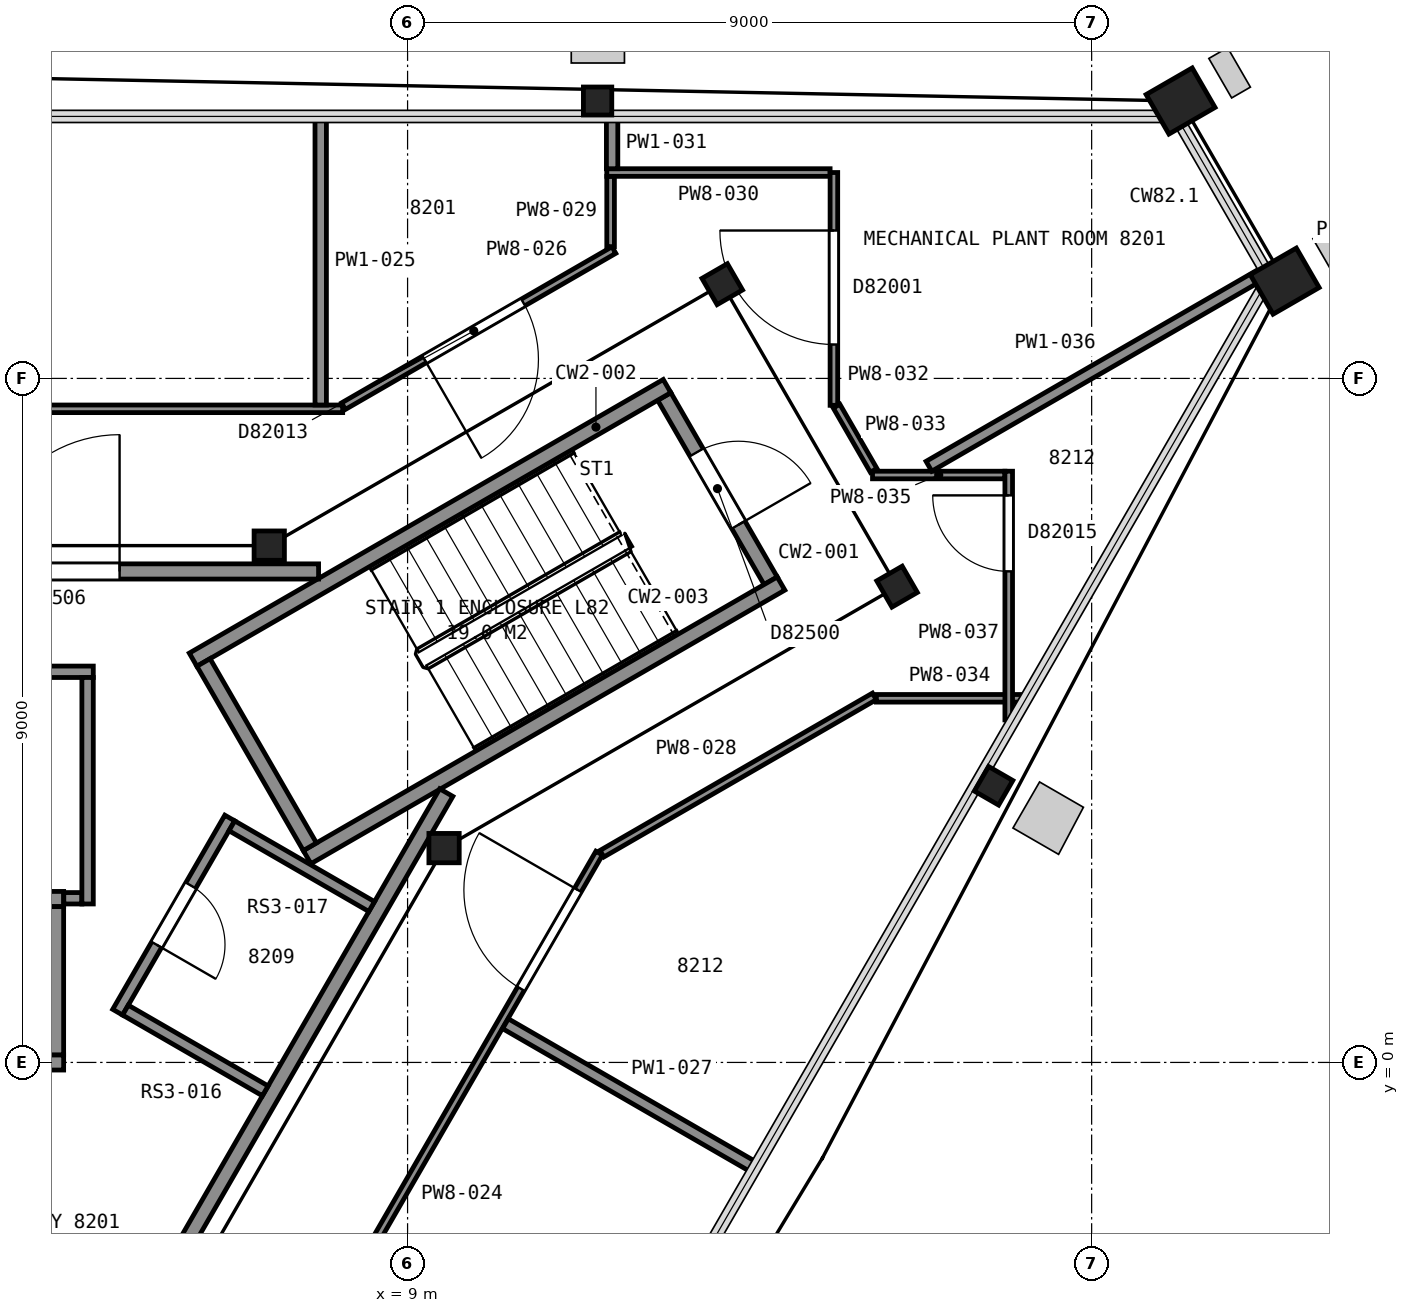
"""IFC4 building model, lengths in metres.
Left out: names, types, materials, properties, quantities, classifications, styles, units other than length and angle.
Written with IfcOpenShell. Run it as: python <this file> out.ifc"""

import sys

from ifc_helpers import new_model, si_unit, direction, frame, frame_2d, origin, origin_2d, place, context, subcontext, project, spatial, rectangle, hollow_rectangle, i_section, extrude, element, fill, save


model = new_model("IFC4")
c1 = context("Model", 3, precision=1e-05, world=origin(), true_north=direction((0.0, 1.0)))
c2 = subcontext(c1, "Body", "Model", "MODEL_VIEW")
j1 = project(units=[si_unit("LENGTHUNIT", "METRE"), si_unit("PLANEANGLEUNIT", "RADIAN")], contexts=[c1])
p1 = place(None, origin())
s1 = spatial("IfcSite", under=j1, at=p1, CompositionType="ELEMENT")
p2 = place(p1, origin())
s2 = spatial("IfcBuilding", under=s1, at=p2, CompositionType="ELEMENT")
p3 = place(p2, frame((0.0, 0.0, 325.2)))
s3 = spatial("IfcBuildingStorey", under=s2, at=p3, CompositionType="ELEMENT", Elevation=325.2)
p4 = place(p3, frame((19.17, 12.65, 0.0), z_axis=(0.0, 0.0, 1.0), x_axis=(0.5, -0.866025403784, 0.0)))
e1 = element("IfcColumn", 1, at=p4, inside=s3, PredefinedType="COLUMN", context=c2, shape_type="SweptSolid", body=[
    extrude(hollow_rectangle(XDim=0.6, YDim=0.7, WallThickness=0.04, at=origin_2d()), origin(), (0.0, 0.0, 1.0), 4.2),
])
for number, where, z_axis, x_axis in (
    (2, (11.5, 12.65, 0.0), (0.0, 0.0, 1.0), (1.0, 0.0, 0.0)),
    (3, (16.71, 3.64, 0.0), (0.0, 0.0, 1.0), (-0.5, -0.866, 0.0)),
):
    element("IfcColumn", number, at=place(p3, frame(where, z_axis=z_axis, x_axis=x_axis)), inside=s3, PredefinedType="COLUMN", context=c2, shape_type="SweptSolid", body=[
        extrude(i_section(OverallWidth=0.373, OverallDepth=0.368, WebThickness=0.015, FlangeThickness=0.024, FilletRadius=0.015, at=origin_2d()), origin(), (0.0, 0.0, 1.0), 4.2),
    ])
p5 = place(p3, frame((20.54, 10.28, 0.0), z_axis=(0.0, 0.0, 1.0), x_axis=(0.5, -0.866025403784, 0.0)))
e4 = element("IfcColumn", 4, at=p5, inside=s3, PredefinedType="COLUMN", context=c2, shape_type="SweptSolid", body=[
    extrude(hollow_rectangle(XDim=0.6, YDim=0.7, WallThickness=0.04, at=origin_2d()), origin(), (0.0, 0.0, 1.0), 4.2),
])
for number, where, z_axis, x_axis in (
    (5, (9.48, 2.82, 0.0), (0.0, 0.0, 1.0), (1.0, 0.0, 0.0)),
    (6, (15.44, 6.26, 0.0), (0.0, 0.0, 1.0), (0.5, -0.866, 0.0)),
    (7, (13.14, 10.24, 0.0), (0.0, 0.0, 1.0), (0.5, -0.866, 0.0)),
    (8, (7.18, 6.8, 0.0), (0.0, 0.0, 1.0), (1.0, 0.0, 0.0)),
):
    element("IfcColumn", number, at=place(p3, frame(where, z_axis=z_axis, x_axis=x_axis)), inside=s3, PredefinedType="COLUMN", context=c2, shape_type="SweptSolid", body=[
        extrude(i_section(OverallWidth=0.399, OverallDepth=0.386, WebThickness=0.021, FlangeThickness=0.033, FilletRadius=0.015, at=origin_2d()), origin(), (0.0, 0.0, 1.0), 4.2),
    ])
p6 = place(p3, frame((13.777, 6.338, 0.0), z_axis=(0.0, 0.0, 1.0), x_axis=(-0.500049511043, 0.865996816683, 0.0)))
e9 = element("IfcWall", 9, at=p6, inside=s3, PredefinedType="PARTITIONING", context=c2, shape_type="SweptSolid", body=[
    extrude(rectangle(XDim=2.8, YDim=0.2, at=frame_2d((1.4, 0.0))), origin(), (0.0, 0.0, 1.0), 3.95),
])
p7 = place(p6, frame((0.85, 0.0, 0.0)))
e10 = element("IfcOpeningElement", 10, at=p7, cuts=e9, PredefinedType="OPENING", context=c2, shape_type="SweptSolid", body=[
    extrude(rectangle(XDim=1.1, YDim=2.1, at=frame_2d((0.55, 1.05))), frame((0.0, 0.11, 0.0), z_axis=(0.0, -1.0, 0.0), x_axis=(1.0, 0.0, 0.0)), (0.0, 0.0, 1.0), 0.22),
])
for number, where, z_axis, x_axis in (
    (11, (6.178, 5.299, 0.0), (0.0, 0.0, 1.0), (0.866, 0.5, 0.0)),
    (12, (7.678, 2.701, 0.0), (0.0, 0.0, 1.0), (0.866, 0.5, 0.0)),
):
    element("IfcWall", number, at=place(p3, frame(where, z_axis=z_axis, x_axis=x_axis)), inside=s3, PredefinedType="PARTITIONING", context=c2, shape_type="SweptSolid", body=[
        extrude(rectangle(XDim=7.2, YDim=0.2, at=frame_2d((3.6, 0.0))), origin(), (0.0, 0.0, 1.0), 3.95),
    ])
p8 = place(p3, frame((7.715, 2.838, 0.0), z_axis=(0.0, 0.0, 1.0), x_axis=(-0.500049511043, 0.865996816683, 0.0)))
e13 = element("IfcWall", 13, at=p8, inside=s3, PredefinedType="PARTITIONING", context=c2, shape_type="SweptSolid", body=[
    extrude(rectangle(XDim=2.8, YDim=0.2, at=frame_2d((1.4, 0.0))), origin(), (0.0, 0.0, 1.0), 3.95),
])
p9 = place(p3, frame((1.525, 0.0, 0.0), z_axis=(0.0, 0.0, 1.0), x_axis=(1.0, 0.0, 0.0)))
e14 = element("IfcWall", 14, at=p9, inside=s3, PredefinedType="PARTITIONING", context=c2, shape_type="SweptSolid", body=[
    extrude(rectangle(XDim=2.95, YDim=0.2, at=frame_2d((1.475, 0.0))), origin(), (0.0, 0.0, 1.0), 4.2),
])
p10 = place(p3, frame((1.525, 2.15, 0.0), z_axis=(0.0, 0.0, 1.0), x_axis=(1.0, 0.0, 0.0)))
e15 = element("IfcWall", 15, at=p10, inside=s3, PredefinedType="PARTITIONING", context=c2, shape_type="SweptSolid", body=[
    extrude(rectangle(XDim=2.95, YDim=0.2, at=frame_2d((1.475, 0.0))), origin(), (0.0, 0.0, 1.0), 4.2),
])
p11 = place(p10, frame((0.925, 0.0, 0.0)))
e16 = element("IfcOpeningElement", 16, at=p11, cuts=e15, PredefinedType="OPENING", context=c2, shape_type="SweptSolid", body=[
    extrude(rectangle(XDim=1.1, YDim=2.1, at=frame_2d((0.55, 1.05))), frame((0.0, 0.11, 0.0), z_axis=(0.0, -1.0, 0.0), x_axis=(1.0, 0.0, 0.0)), (0.0, 0.0, 1.0), 0.22),
])
p12 = place(p3, frame((4.375, 0.1, 0.0), z_axis=(0.0, 0.0, 1.0), x_axis=(0.0, 1.0, 0.0)))
e17 = element("IfcWall", 17, at=p12, inside=s3, PredefinedType="PARTITIONING", context=c2, shape_type="SweptSolid", body=[
    extrude(rectangle(XDim=1.95, YDim=0.2, at=frame_2d((0.975, 0.0))), origin(), (0.0, 0.0, 1.0), 4.2),
])
p13 = place(p3, frame((7.829, 6.46, 0.0), z_axis=(0.0, 0.0, 1.0), x_axis=(-1.0, 0.0, 0.0)))
e18 = element("IfcWall", 18, at=p13, inside=s3, PredefinedType="PARTITIONING", context=c2, shape_type="SweptSolid", body=[
    extrude(rectangle(XDim=15.658, YDim=0.2, at=frame_2d((7.829, 0.0))), origin(), (0.0, 0.0, 1.0), 3.95),
])
p14 = place(p13, frame((2.618, 0.0, 0.0)))
e19 = element("IfcOpeningElement", 19, at=p14, cuts=e18, PredefinedType="OPENING", context=c2, shape_type="SweptSolid", body=[
    extrude(rectangle(XDim=1.8, YDim=2.1, at=frame_2d((0.9, 1.05))), frame((0.0, 0.11, 0.0), z_axis=(0.0, -1.0, 0.0), x_axis=(1.0, 0.0, 0.0)), (0.0, 0.0, 1.0), 0.22),
])
p15 = place(p3, frame((-0.245, 5.14, 0.0), z_axis=(0.0, 0.0, 1.0), x_axis=(1.0, 0.0, 0.0)))
e20 = element("IfcWall", 20, at=p15, inside=s3, PredefinedType="PARTITIONING", context=c2, shape_type="SweptSolid", body=[
    extrude(rectangle(XDim=5.11, YDim=0.15, at=frame_2d((2.555, 0.0))), origin(), (0.0, 0.0, 1.0), 3.95),
])
p16 = place(p15, frame((1.975, 0.0, 0.0)))
e21 = element("IfcOpeningElement", 21, at=p16, cuts=e20, PredefinedType="OPENING", context=c2, shape_type="SweptSolid", body=[
    extrude(rectangle(XDim=1.0, YDim=2.1, at=frame_2d((0.5, 1.05))), frame((0.0, 0.085, 0.0), z_axis=(0.0, -1.0, 0.0), x_axis=(1.0, 0.0, 0.0)), (0.0, 0.0, 1.0), 0.17),
])
p17 = place(p3, frame((2.552, -8.5, 0.0), z_axis=(0.0, 0.0, 1.0), x_axis=(0.499981156672, 0.866036282712, 0.0)))
e22 = element("IfcWall", 22, at=p17, inside=s3, PredefinedType="PARTITIONING", context=c2, shape_type="SweptSolid", body=[
    extrude(rectangle(XDim=13.915, YDim=0.2, at=frame_2d((6.957, 0.0))), origin(), (0.0, 0.0, 1.0), 3.95),
])
p18 = place(p3, frame((4.477, 2.16, 0.0), z_axis=(0.0, 0.0, 1.0), x_axis=(1.0, 0.0, 0.0)))
e23 = element("IfcWall", 23, at=p18, inside=s3, PredefinedType="PARTITIONING", context=c2, shape_type="SweptSolid", body=[
    extrude(rectangle(XDim=0.238, YDim=0.15, at=frame_2d((0.119, 0.0))), origin(), (0.0, 0.0, 1.0), 3.95),
])
p19 = place(p3, frame((4.79, 2.085, 0.0), z_axis=(0.0, 0.0, 1.0), x_axis=(0.0, 1.0, 0.0)))
e24 = element("IfcWall", 24, at=p19, inside=s3, PredefinedType="PARTITIONING", context=c2, shape_type="SweptSolid", body=[
    extrude(rectangle(XDim=2.98, YDim=0.15, at=frame_2d((1.49, 0.0))), origin(), (0.0, 0.0, 1.0), 3.95),
])
p20 = place(p3, frame((6.66, 3.216, 0.0), z_axis=(0.0, 0.0, 1.0), x_axis=(-0.499939757307, -0.866060182126, 0.0)))
e25 = element("IfcWall", 25, at=p20, inside=s3, PredefinedType="PARTITIONING", context=c2, shape_type="SweptSolid", body=[
    extrude(rectangle(XDim=2.95, YDim=0.15, at=frame_2d((1.475, 0.0))), origin(), (0.0, 0.0, 1.0), 3.95),
])
p21 = place(p20, frame((1.025, 0.0, 0.0)))
e26 = element("IfcOpeningElement", 26, at=p21, cuts=e25, PredefinedType="OPENING", context=c2, shape_type="SweptSolid", body=[
    extrude(rectangle(XDim=0.9, YDim=2.1, at=frame_2d((0.45, 1.05))), frame((0.0, 0.085, 0.0), z_axis=(0.0, -1.0, 0.0), x_axis=(1.0, 0.0, 0.0)), (0.0, 0.0, 1.0), 0.17),
])
p22 = place(p3, frame((5.288, 0.688, 0.0), z_axis=(0.0, 0.0, 1.0), x_axis=(0.8659425006, -0.500143565044, 0.0)))
e27 = element("IfcWall", 27, at=p22, inside=s3, PredefinedType="PARTITIONING", context=c2, shape_type="SweptSolid", body=[
    extrude(rectangle(XDim=2.125, YDim=0.15, at=frame_2d((1.062, 0.0))), origin(), (0.0, 0.0, 1.0), 3.95),
])
p23 = place(p3, frame((6.688, 3.114, 0.0), z_axis=(0.0, 0.0, 1.0), x_axis=(0.865913749133, -0.500193341681, 0.0)))
e28 = element("IfcWall", 28, at=p23, inside=s3, PredefinedType="PARTITIONING", context=c2, shape_type="SweptSolid", body=[
    extrude(rectangle(XDim=2.124, YDim=0.15, at=frame_2d((1.062, 0.0))), origin(), (0.0, 0.0, 1.0), 3.95),
])
p24 = place(p3, frame((-8.146, 8.6, 0.0), z_axis=(0.0, 0.0, 1.0), x_axis=(1.0, 0.0, 0.0)))
e29 = element("IfcWall", 29, at=p24, inside=s3, PredefinedType="PARTITIONING", context=c2, shape_type="SweptSolid", body=[
    extrude(rectangle(XDim=16.292, YDim=0.1, at=frame_2d((8.146, 0.0))), origin(), (0.0, 0.0, 1.0), 3.297),
])
p25 = place(p24, frame((8.511, 0.0, 0.0)))
e30 = element("IfcOpeningElement", 30, at=p25, cuts=e29, PredefinedType="OPENING", context=c2, shape_type="SweptSolid", body=[
    extrude(rectangle(XDim=1.5, YDim=2.1, at=frame_2d((0.75, 1.05))), frame((0.0, 0.06, 0.0), z_axis=(0.0, -1.0, 0.0), x_axis=(1.0, 0.0, 0.0)), (0.0, 0.0, 1.0), 0.12),
])
p26 = place(p24, frame((0.55, 0.0, 0.0)))
e31 = element("IfcOpeningElement", 31, at=p26, cuts=e29, PredefinedType="OPENING", context=c2, shape_type="SweptSolid", body=[
    extrude(rectangle(XDim=1.5, YDim=2.1, at=frame_2d((0.75, 1.05))), frame((0.0, 0.06, 0.0), z_axis=(0.0, -1.0, 0.0), x_axis=(1.0, 0.0, 0.0)), (0.0, 0.0, 1.0), 0.12),
])
p27 = place(p3, frame((11.521, 2.754, 0.0), z_axis=(0.0, 0.0, 1.0), x_axis=(-0.500044034969, -0.86599997869, 0.0)))
e32 = element("IfcWall", 32, at=p27, inside=s3, PredefinedType="PARTITIONING", context=c2, shape_type="SweptSolid", body=[
    extrude(rectangle(XDim=15.553, YDim=0.1, at=frame_2d((7.776, 0.0))), origin(), (0.0, 0.0, 1.0), 3.297),
])
p28 = place(p27, frame((8.303, 0.0, 0.0)))
e33 = element("IfcOpeningElement", 33, at=p28, cuts=e32, PredefinedType="OPENING", context=c2, shape_type="SweptSolid", body=[
    extrude(rectangle(XDim=1.5, YDim=2.1, at=frame_2d((0.75, 1.05))), frame((0.0, 0.06, 0.0), z_axis=(0.0, -1.0, 0.0), x_axis=(1.0, 0.0, 0.0)), (0.0, 0.0, 1.0), 0.12),
])
p29 = place(p27, frame((0.561, 0.0, 0.0)))
e34 = element("IfcOpeningElement", 34, at=p29, cuts=e32, PredefinedType="OPENING", context=c2, shape_type="SweptSolid", body=[
    extrude(rectangle(XDim=1.5, YDim=2.1, at=frame_2d((0.75, 1.05))), frame((0.0, 0.06, 0.0), z_axis=(0.0, -1.0, 0.0), x_axis=(1.0, 0.0, 0.0)), (0.0, 0.0, 1.0), 0.12),
])
p30 = place(p3, frame((7.857, 8.65, 0.0), z_axis=(0.0, 0.0, 1.0), x_axis=(0.0, 1.0, 0.0)))
e35 = element("IfcWall", 35, at=p30, inside=s3, PredefinedType="PARTITIONING", context=c2, shape_type="SweptSolid", body=[
    extrude(rectangle(XDim=3.783, YDim=0.15, at=frame_2d((1.892, 0.0))), origin(), (0.0, 0.0, 1.0), 3.297),
])
p31 = place(p3, frame((8.157, 8.635, 0.0), z_axis=(0.0, 0.0, 1.0), x_axis=(0.866029215606, 0.499993397673, 0.0)))
e36 = element("IfcWall", 36, at=p31, inside=s3, PredefinedType="PARTITIONING", context=c2, shape_type="SweptSolid", body=[
    extrude(rectangle(XDim=4.108, YDim=0.1, at=frame_2d((2.054, 0.0))), origin(), (0.0, 0.0, 1.0), 3.297),
])
p32 = place(p31, frame((1.23, 0.0, 0.0)))
e37 = element("IfcOpeningElement", 37, at=p32, cuts=e36, PredefinedType="OPENING", context=c2, shape_type="SweptSolid", body=[
    extrude(rectangle(XDim=1.5, YDim=2.1, at=frame_2d((0.75, 1.05))), frame((0.0, 0.06, 0.0), z_axis=(0.0, -1.0, 0.0), x_axis=(1.0, 0.0, 0.0)), (0.0, 0.0, 1.0), 0.12),
])
p33 = place(p3, frame((10.288, 0.51, 0.0), z_axis=(0.0, 0.0, 1.0), x_axis=(0.865987581393, -0.500065504582, 0.0)))
e38 = element("IfcWall", 38, at=p33, inside=s3, PredefinedType="PARTITIONING", context=c2, shape_type="SweptSolid", body=[
    extrude(rectangle(XDim=3.778, YDim=0.15, at=frame_2d((1.889, 0.0))), origin(), (0.0, 0.0, 1.0), 3.297),
])
p34 = place(p3, frame((11.557, 2.746, 0.0), z_axis=(0.0, 0.0, 1.0), x_axis=(0.866005840187, 0.500033883614, 0.0)))
e39 = element("IfcWall", 39, at=p34, inside=s3, PredefinedType="PARTITIONING", context=c2, shape_type="SweptSolid", body=[
    extrude(rectangle(XDim=4.139, YDim=0.1, at=frame_2d((2.07, 0.0))), origin(), (0.0, 0.0, 1.0), 3.297),
])
p35 = place(p3, frame((11.671, 10.734, 0.0), z_axis=(0.0, 0.0, 1.0), x_axis=(0.0, 1.0, 0.0)))
e40 = element("IfcWall", 40, at=p35, inside=s3, PredefinedType="PARTITIONING", context=c2, shape_type="SweptSolid", body=[
    extrude(rectangle(XDim=0.925, YDim=0.1, at=frame_2d((0.462, 0.0))), origin(), (0.0, 0.0, 1.0), 3.297),
])
p36 = place(p3, frame((11.621, 11.709, 0.0), z_axis=(0.0, 0.0, 1.0), x_axis=(1.0, 0.0, 0.0)))
e41 = element("IfcWall", 41, at=p36, inside=s3, PredefinedType="PARTITIONING", context=c2, shape_type="SweptSolid", body=[
    extrude(rectangle(XDim=2.938, YDim=0.1, at=frame_2d((1.469, 0.0))), origin(), (0.0, 0.0, 1.0), 3.297),
])
p37 = place(p3, frame((11.691, 11.759, 0.0), z_axis=(0.0, 0.0, 1.0), x_axis=(0.0, 1.0, 0.0)))
e42 = element("IfcWall", 42, at=p37, inside=s3, PredefinedType="PARTITIONING", context=c2, shape_type="SweptSolid", body=[
    extrude(rectangle(XDim=0.674, YDim=0.15, at=frame_2d((0.337, 0.0))), origin(), (0.0, 0.0, 1.0), 3.297),
])
p38 = place(p3, frame((14.609, 11.709, 0.0), z_axis=(0.0, 0.0, 1.0), x_axis=(0.0, -1.0, 0.0)))
e43 = element("IfcWall", 43, at=p38, inside=s3, PredefinedType="PARTITIONING", context=c2, shape_type="SweptSolid", body=[
    extrude(rectangle(XDim=3.063, YDim=0.1, at=frame_2d((1.531, 0.0))), origin(), (0.0, 0.0, 1.0), 3.297),
])
p39 = place(p38, frame((0.763, 0.0, 0.0)))
e44 = element("IfcOpeningElement", 44, at=p39, cuts=e43, PredefinedType="OPENING", context=c2, shape_type="SweptSolid", body=[
    extrude(rectangle(XDim=1.5, YDim=2.1, at=frame_2d((0.75, 1.05))), frame((0.0, 0.06, 0.0), z_axis=(0.0, -1.0, 0.0), x_axis=(1.0, 0.0, 0.0)), (0.0, 0.0, 1.0), 0.12),
])
p40 = place(p3, frame((14.644, 8.635, 0.0), z_axis=(0.0, 0.0, 1.0), x_axis=(0.499823463829, -0.866127303003, 0.0)))
e45 = element("IfcWall", 45, at=p40, inside=s3, PredefinedType="PARTITIONING", context=c2, shape_type="SweptSolid", body=[
    extrude(rectangle(XDim=0.976, YDim=0.1, at=frame_2d((0.488, 0.0))), origin(), (0.0, 0.0, 1.0), 3.297),
])
p41 = place(p3, frame((15.168, 4.791, 0.0), z_axis=(0.0, 0.0, 1.0), x_axis=(1.0, 0.0, 0.0)))
e46 = element("IfcWall", 46, at=p41, inside=s3, PredefinedType="PARTITIONING", context=c2, shape_type="SweptSolid", body=[
    extrude(rectangle(XDim=1.926, YDim=0.1, at=frame_2d((0.963, 0.0))), origin(), (0.0, 0.0, 1.0), 3.297),
])
p42 = place(p3, frame((15.117, 7.729, 0.0), z_axis=(0.0, 0.0, 1.0), x_axis=(1.0, 0.0, 0.0)))
e47 = element("IfcWall", 47, at=p42, inside=s3, PredefinedType="PARTITIONING", context=c2, shape_type="SweptSolid", body=[
    extrude(rectangle(XDim=1.742, YDim=0.1, at=frame_2d((0.871, 0.0))), origin(), (0.0, 0.0, 1.0), 3.297),
])
p43 = place(p3, frame((15.859, 7.844, 0.0), z_axis=(0.0, 0.0, 1.0), x_axis=(0.865941920763, 0.500144568965, 0.0)))
e48 = element("IfcWall", 48, at=p43, inside=s3, PredefinedType="PARTITIONING", context=c2, shape_type="SweptSolid", body=[
    extrude(rectangle(XDim=5.106, YDim=0.15, at=frame_2d((2.553, 0.0))), origin(), (0.0, 0.0, 1.0), 3.297),
])
p44 = place(p3, frame((16.909, 7.779, 0.0), z_axis=(0.0, 0.0, 1.0), x_axis=(0.0, -1.0, 0.0)))
e49 = element("IfcWall", 49, at=p44, inside=s3, PredefinedType="PARTITIONING", context=c2, shape_type="SweptSolid", body=[
    extrude(rectangle(XDim=3.272, YDim=0.1, at=frame_2d((1.636, 0.0))), origin(), (0.0, 0.0, 1.0), 3.297),
])
p45 = place(p44, frame((0.318, 0.0, 0.0)))
e50 = element("IfcOpeningElement", 50, at=p45, cuts=e49, PredefinedType="OPENING", context=c2, shape_type="SweptSolid", body=[
    extrude(rectangle(XDim=1.0, YDim=2.1, at=frame_2d((0.5, 1.05))), frame((0.0, 0.06, 0.0), z_axis=(0.0, -1.0, 0.0), x_axis=(1.0, 0.0, 0.0)), (0.0, 0.0, 1.0), 0.12),
])
p46 = place(p7, origin())
e51 = element("IfcDoor", 51, at=p46, inside=s3, OperationType="SINGLE_SWING_LEFT", PredefinedType="DOOR", context=c2, shape_type="SweptSolid", body=[
    extrude(rectangle(XDim=1.1, YDim=2.1, at=frame_2d((0.55, 1.05))), frame((0.0, 0.025, 0.0), z_axis=(0.0, -1.0, 0.0), x_axis=(1.0, 0.0, 0.0)), (0.0, 0.0, 1.0), 0.05),
])
fill(e10, e51)
p47 = place(p14, origin())
e52 = element("IfcDoor", 52, at=p47, inside=s3, OperationType="DOUBLE_DOOR_SINGLE_SWING", PredefinedType="DOOR", context=c2, shape_type="SweptSolid", body=[
    extrude(rectangle(XDim=1.8, YDim=2.1, at=frame_2d((0.9, 1.05))), frame((0.0, 0.025, 0.0), z_axis=(0.0, -1.0, 0.0), x_axis=(1.0, 0.0, 0.0)), (0.0, 0.0, 1.0), 0.05),
])
fill(e19, e52)
p48 = place(p21, origin())
e53 = element("IfcDoor", 53, at=p48, inside=s3, OperationType="SINGLE_SWING_RIGHT", PredefinedType="DOOR", context=c2, shape_type="SweptSolid", body=[
    extrude(rectangle(XDim=0.9, YDim=2.1, at=frame_2d((0.45, 1.05))), frame((0.0, 0.025, 0.0), z_axis=(0.0, -1.0, 0.0), x_axis=(1.0, 0.0, 0.0)), (0.0, 0.0, 1.0), 0.05),
])
fill(e26, e53)
p49 = place(p29, origin())
e54 = element("IfcDoor", 54, at=p49, inside=s3, OperationType="DOUBLE_DOOR_SINGLE_SWING", PredefinedType="DOOR", context=c2, shape_type="SweptSolid", body=[
    extrude(rectangle(XDim=1.5, YDim=2.1, at=frame_2d((0.75, 1.05))), frame((0.0, 0.025, 0.0), z_axis=(0.0, -1.0, 0.0), x_axis=(1.0, 0.0, 0.0)), (0.0, 0.0, 1.0), 0.05),
])
fill(e34, e54)
p50 = place(p32, origin())
e55 = element("IfcDoor", 55, at=p50, inside=s3, OperationType="DOUBLE_DOOR_SINGLE_SWING", PredefinedType="DOOR", context=c2, shape_type="SweptSolid", body=[
    extrude(rectangle(XDim=1.5, YDim=2.1, at=frame_2d((0.75, 1.05))), frame((0.0, 0.025, 0.0), z_axis=(0.0, -1.0, 0.0), x_axis=(1.0, 0.0, 0.0)), (0.0, 0.0, 1.0), 0.05),
])
fill(e37, e55)
p51 = place(p39, origin())
e56 = element("IfcDoor", 56, at=p51, inside=s3, OperationType="DOUBLE_DOOR_SINGLE_SWING", PredefinedType="DOOR", context=c2, shape_type="SweptSolid", body=[
    extrude(rectangle(XDim=1.5, YDim=2.1, at=frame_2d((0.75, 1.05))), frame((0.0, 0.025, 0.0), z_axis=(0.0, -1.0, 0.0), x_axis=(1.0, 0.0, 0.0)), (0.0, 0.0, 1.0), 0.05),
])
fill(e44, e56)
p52 = place(p45, origin())
e57 = element("IfcDoor", 57, at=p52, inside=s3, OperationType="SINGLE_SWING_LEFT", PredefinedType="DOOR", context=c2, shape_type="SweptSolid", body=[
    extrude(rectangle(XDim=1.0, YDim=2.1, at=frame_2d((0.5, 1.05))), frame((0.0, 0.025, 0.0), z_axis=(0.0, -1.0, 0.0), x_axis=(1.0, 0.0, 0.0)), (0.0, 0.0, 1.0), 0.05),
])
fill(e50, e57)
save(model, sys.argv[1])
